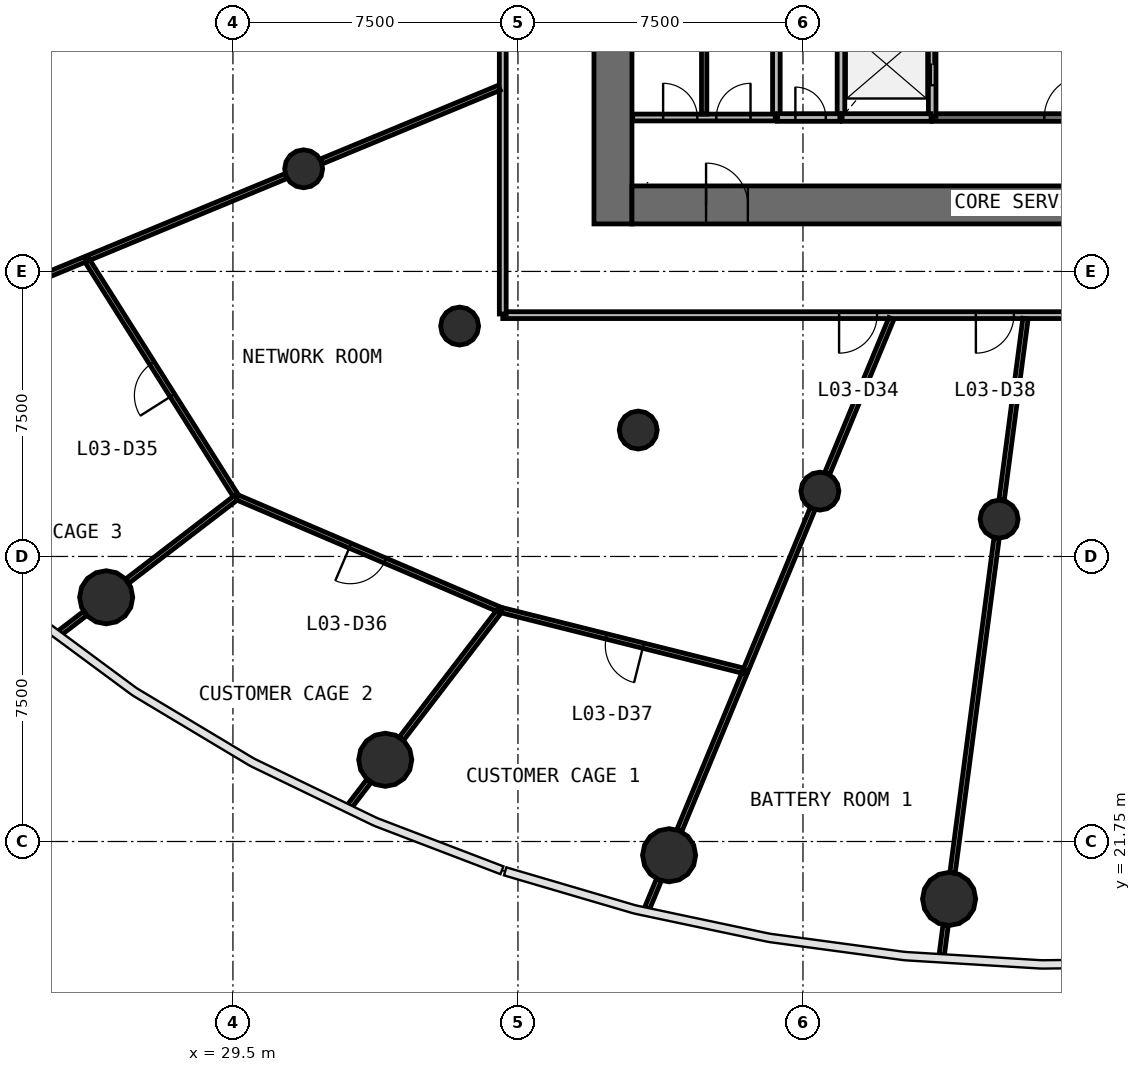
"""IFC4 building model, lengths in metres.
Left out: names, types, materials, properties, quantities, classifications, styles, units other than length and angle.
Written with IfcOpenShell. Run it as: python <this file> out.ifc"""

import sys

from ifc_helpers import new_model, si_unit, direction, frame, frame_2d, origin, origin_2d, place, context, subcontext, project, spatial, rectangle, circle, extrude, source, transform, mapped, element, fill, save


model = new_model("IFC4")
c1 = context("Model", 3, precision=1e-05, world=origin(), true_north=direction((0.0, 1.0)))
c2 = subcontext(c1, "Body", "Model", "MODEL_VIEW")
j1 = project(units=[si_unit("LENGTHUNIT", "METRE"), si_unit("PLANEANGLEUNIT", "RADIAN")], contexts=[c1])
p1 = place(None, origin())
s1 = spatial("IfcSite", under=j1, at=p1, CompositionType="ELEMENT")
p2 = place(p1, origin())
s2 = spatial("IfcBuilding", under=s1, at=p2, CompositionType="ELEMENT")
p3 = place(p2, frame((0.0, 0.0, 13.8)))
s3 = spatial("IfcBuildingStorey", under=s2, at=p3, CompositionType="ELEMENT", Elevation=13.8)
p4 = place(p3, frame((39.5, 58.0, 0.0), z_axis=(0.0, 0.0, 1.0), x_axis=(0.0, -1.0, 0.0)))
e1 = element("IfcWall", 1, at=p4, inside=s3, PredefinedType="SHEAR", context=c2, shape_type="SweptSolid", body=[
    extrude(rectangle(XDim=20.0, YDim=1.0, at=frame_2d((10.0, 0.0))), origin(), (0.0, 0.0, 1.0), 4.4),
])
p5 = place(p4, frame((9.1, 0.0, 0.0)))
e2 = element("IfcOpeningElement", 2, at=p5, cuts=e1, PredefinedType="OPENING", context=c2, shape_type="SweptSolid", body=[
    extrude(rectangle(XDim=1.8, YDim=2.1, at=frame_2d((0.9, 1.05))), frame((0.0, 0.51, 0.0), z_axis=(0.0, -1.0, 0.0), x_axis=(1.0, 0.0, 0.0)), (0.0, 0.0, 1.0), 1.02),
])
p6 = place(p3, frame((40.0, 38.5, 0.0), z_axis=(0.0, 0.0, 1.0), x_axis=(1.0, 0.0, 0.0)))
e3 = element("IfcWall", 3, at=p6, inside=s3, PredefinedType="SHEAR", context=c2, shape_type="SweptSolid", body=[
    extrude(rectangle(XDim=24.0, YDim=1.0, at=frame_2d((12.0, 0.0))), origin(), (0.0, 0.0, 1.0), 4.4),
])
p7 = place(p6, frame((21.45, 0.0, 0.0)))
e4 = element("IfcOpeningElement", 4, at=p7, cuts=e3, PredefinedType="OPENING", context=c2, shape_type="SweptSolid", body=[
    extrude(rectangle(XDim=1.1, YDim=2.1, at=frame_2d((0.55, 1.05))), frame((0.0, 0.51, 0.0), z_axis=(0.0, -1.0, 0.0), x_axis=(1.0, 0.0, 0.0)), (0.0, 0.0, 1.0), 1.02),
])
p8 = place(p6, frame((1.95, 0.0, 0.0)))
e5 = element("IfcOpeningElement", 5, at=p8, cuts=e3, PredefinedType="OPENING", context=c2, shape_type="SweptSolid", body=[
    extrude(rectangle(XDim=1.1, YDim=2.1, at=frame_2d((0.55, 1.05))), frame((0.0, 0.51, 0.0), z_axis=(0.0, -1.0, 0.0), x_axis=(1.0, 0.0, 0.0)), (0.0, 0.0, 1.0), 1.02),
])
m1 = source(origin(), c2, "Body", "SweptSolid", [
    extrude(circle(Radius=0.7, at=origin_2d()), origin(), (0.0, 0.0, 1.0), 4.4),
])
for number, where, z_axis, x_axis in (
    (6, (26.164, 28.176, 0.0), (0.0, 0.0, 1.0), (1.0, 0.0, 0.0)),
    (7, (33.508, 23.9, 0.0), (0.0, 0.0, 1.0), (1.0, 0.0, 0.0)),
    (8, (40.977, 21.389, 0.0), (0.0, 0.0, 1.0), (1.0, 0.0, 0.0)),
    (9, (48.345, 20.239, 0.0), (0.0, 0.0, 1.0), (1.0, 0.0, 0.0)),
):
    element("IfcColumn", number, at=place(p3, frame(where, z_axis=z_axis, x_axis=x_axis)), inside=s3, PredefinedType="COLUMN", context=c2, shape_type="MappedRepresentation", body=[
        mapped(m1, transform((0.0, 0.0, 0.0), scale=1.0)),
    ])
m2 = source(origin(), c2, "Body", "SweptSolid", [
    extrude(circle(Radius=0.5, at=origin_2d()), origin(), (0.0, 0.0, 1.0), 4.4),
])
for number, where, z_axis, x_axis in (
    (10, (31.361, 39.451, 0.0), (0.0, 0.0, 1.0), (1.0, 0.0, 0.0)),
    (11, (35.465, 35.312, 0.0), (0.0, 0.0, 1.0), (1.0, 0.0, 0.0)),
    (12, (40.165, 32.576, 0.0), (0.0, 0.0, 1.0), (1.0, 0.0, 0.0)),
    (13, (44.945, 30.969, 0.0), (0.0, 0.0, 1.0), (1.0, 0.0, 0.0)),
    (14, (49.661, 30.233, 0.0), (0.0, 0.0, 1.0), (1.0, 0.0, 0.0)),
):
    element("IfcColumn", number, at=place(p3, frame(where, z_axis=z_axis, x_axis=x_axis)), inside=s3, PredefinedType="COLUMN", context=c2, shape_type="MappedRepresentation", body=[
        mapped(m2, transform((0.0, 0.0, 0.0), scale=1.0)),
    ])
p9 = place(p3, frame((47.9, 40.8, 0.0), z_axis=(0.0, 0.0, 1.0), x_axis=(1.0, 0.0, 0.0)))
e15 = element("IfcWall", 15, at=p9, inside=s3, PredefinedType="SOLIDWALL", context=c2, shape_type="SweptSolid", body=[
    extrude(rectangle(XDim=5.67, YDim=0.2, at=frame_2d((2.835, 0.0))), origin(), (0.0, 0.0, 1.0), 4.05),
])
p10 = place(p9, frame((2.95, 0.0, 0.0)))
e16 = element("IfcOpeningElement", 16, at=p10, cuts=e15, PredefinedType="OPENING", context=c2, shape_type="SweptSolid", body=[
    extrude(rectangle(XDim=1.1, YDim=2.1, at=frame_2d((0.55, 1.05))), frame((0.0, 0.11, 0.0), z_axis=(0.0, -1.0, 0.0), x_axis=(1.0, 0.0, 0.0)), (0.0, 0.0, 1.0), 0.22),
])
for number, where, z_axis, x_axis in (
    (17, (43.8, 43.6, 0.0), (0.0, 0.0, 1.0), (0.0, -1.0, 0.0)),
    (18, (45.5, 43.6, 0.0), (0.0, 0.0, 1.0), (0.0, -1.0, 0.0)),
):
    element("IfcWall", number, at=place(p3, frame(where, z_axis=z_axis, x_axis=x_axis)), inside=s3, PredefinedType="SOLIDWALL", context=c2, shape_type="SweptSolid", body=[
        extrude(rectangle(XDim=2.8, YDim=0.2, at=frame_2d((1.4, 0.0))), origin(), (0.0, 0.0, 1.0), 4.05),
    ])
p11 = place(p3, frame((47.9, 40.83, 0.0), z_axis=(0.0, 0.0, 1.0), x_axis=(0.0, 1.0, 0.0)))
e19 = element("IfcWall", 19, at=p11, inside=s3, PredefinedType="SOLIDWALL", context=c2, shape_type="SweptSolid", body=[
    extrude(rectangle(XDim=2.77, YDim=0.2, at=frame_2d((1.385, 0.0))), origin(), (0.0, 0.0, 1.0), 4.05),
])
p12 = place(p11, frame((0.82, 0.0, 0.0)))
e20 = element("IfcOpeningElement", 20, at=p12, cuts=e19, PredefinedType="OPENING", context=c2, shape_type="SweptSolid", body=[
    extrude(rectangle(XDim=1.1, YDim=2.1, at=frame_2d((0.55, 1.05))), frame((0.0, 0.11, 0.0), z_axis=(0.0, -1.0, 0.0), x_axis=(1.0, 0.0, 0.0)), (0.0, 0.0, 1.0), 0.22),
])
p13 = place(p3, frame((45.53, 40.8, 0.0), z_axis=(0.0, 0.0, 1.0), x_axis=(1.0, 0.0, 0.0)))
e21 = element("IfcWall", 21, at=p13, inside=s3, PredefinedType="SOLIDWALL", context=c2, shape_type="SweptSolid", body=[
    extrude(rectangle(XDim=2.34, YDim=0.2, at=frame_2d((1.17, 0.0))), origin(), (0.0, 0.0, 1.0), 4.05),
])
p14 = place(p3, frame((43.83, 40.8, 0.0), z_axis=(0.0, 0.0, 1.0), x_axis=(1.0, 0.0, 0.0)))
e22 = element("IfcWall", 22, at=p14, inside=s3, PredefinedType="SOLIDWALL", context=c2, shape_type="SweptSolid", body=[
    extrude(rectangle(XDim=1.64, YDim=0.2, at=frame_2d((0.82, 0.0))), origin(), (0.0, 0.0, 1.0), 4.05),
])
p15 = place(p14, frame((0.47, 0.0, 0.0)))
e23 = element("IfcOpeningElement", 23, at=p15, cuts=e22, PredefinedType="OPENING", context=c2, shape_type="SweptSolid", body=[
    extrude(rectangle(XDim=0.8, YDim=2.1, at=frame_2d((0.4, 1.05))), frame((0.0, 0.11, 0.0), z_axis=(0.0, -1.0, 0.0), x_axis=(1.0, 0.0, 0.0)), (0.0, 0.0, 1.0), 0.22),
])
p16 = place(p3, frame((67.4, 35.6, 0.0), z_axis=(0.0, 0.0, 1.0), x_axis=(-1.0, 0.0, 0.0)))
e24 = element("IfcWall", 24, at=p16, inside=s3, PredefinedType="PARTITIONING", context=c2, shape_type="SweptSolid", body=[
    extrude(rectangle(XDim=30.8, YDim=0.18, at=frame_2d((15.4, 0.0))), origin(), (0.0, 0.0, 1.0), 3.25),
])
p17 = place(p16, frame((20.95, 0.0, 0.0)))
e25 = element("IfcOpeningElement", 25, at=p17, cuts=e24, PredefinedType="OPENING", context=c2, shape_type="SweptSolid", body=[
    extrude(rectangle(XDim=1.0, YDim=2.1, at=frame_2d((0.5, 1.05))), frame((0.0, 0.1, 0.0), z_axis=(0.0, -1.0, 0.0), x_axis=(1.0, 0.0, 0.0)), (0.0, 0.0, 1.0), 0.2),
])
p18 = place(p16, frame((17.35, 0.0, 0.0)))
e26 = element("IfcOpeningElement", 26, at=p18, cuts=e24, PredefinedType="OPENING", context=c2, shape_type="SweptSolid", body=[
    extrude(rectangle(XDim=1.0, YDim=2.1, at=frame_2d((0.5, 1.05))), frame((0.0, 0.1, 0.0), z_axis=(0.0, -1.0, 0.0), x_axis=(1.0, 0.0, 0.0)), (0.0, 0.0, 1.0), 0.2),
])
p19 = place(p16, frame((14.95, 0.0, 0.0)))
e27 = element("IfcOpeningElement", 27, at=p19, cuts=e24, PredefinedType="OPENING", context=c2, shape_type="SweptSolid", body=[
    extrude(rectangle(XDim=1.0, YDim=2.1, at=frame_2d((0.5, 1.05))), frame((0.0, 0.1, 0.0), z_axis=(0.0, -1.0, 0.0), x_axis=(1.0, 0.0, 0.0)), (0.0, 0.0, 1.0), 0.2),
])
p20 = place(p3, frame((36.6, 35.63, 0.0), z_axis=(0.0, 0.0, 1.0), x_axis=(0.0, 1.0, 0.0)))
e28 = element("IfcWall", 28, at=p20, inside=s3, PredefinedType="PARTITIONING", context=c2, shape_type="SweptSolid", body=[
    extrude(rectangle(XDim=23.583, YDim=0.18, at=frame_2d((11.791, 0.0))), origin(), (0.0, 0.0, 1.0), 3.25),
])
p21 = place(p20, frame((11.333, 0.0, 0.0)))
e29 = element("IfcOpeningElement", 29, at=p21, cuts=e28, PredefinedType="OPENING", context=c2, shape_type="SweptSolid", body=[
    extrude(rectangle(XDim=1.0, YDim=2.1, at=frame_2d((0.5, 1.05))), frame((0.0, 0.1, 0.0), z_axis=(0.0, -1.0, 0.0), x_axis=(1.0, 0.0, 0.0)), (0.0, 0.0, 1.0), 0.2),
])
p22 = place(p3, frame((40.02, 40.8, 0.0), z_axis=(0.0, 0.0, 1.0), x_axis=(1.0, 0.0, 0.0)))
e30 = element("IfcWall", 30, at=p22, inside=s3, PredefinedType="PARTITIONING", context=c2, shape_type="SweptSolid", body=[
    extrude(rectangle(XDim=3.75, YDim=0.18, at=frame_2d((1.875, 0.0))), origin(), (0.0, 0.0, 1.0), 4.05),
])
p23 = place(p22, frame((0.8, 0.0, 0.0)))
e31 = element("IfcOpeningElement", 31, at=p23, cuts=e30, PredefinedType="OPENING", context=c2, shape_type="SweptSolid", body=[
    extrude(rectangle(XDim=0.9, YDim=2.1, at=frame_2d((0.45, 1.05))), frame((0.0, 0.1, 0.0), z_axis=(0.0, -1.0, 0.0), x_axis=(1.0, 0.0, 0.0)), (0.0, 0.0, 1.0), 0.2),
])
p24 = place(p22, frame((2.2, 0.0, 0.0)))
e32 = element("IfcOpeningElement", 32, at=p24, cuts=e30, PredefinedType="OPENING", context=c2, shape_type="SweptSolid", body=[
    extrude(rectangle(XDim=0.9, YDim=2.1, at=frame_2d((0.45, 1.05))), frame((0.0, 0.1, 0.0), z_axis=(0.0, -1.0, 0.0), x_axis=(1.0, 0.0, 0.0)), (0.0, 0.0, 1.0), 0.2),
])
p25 = place(p3, frame((49.595, 29.733, 0.0), z_axis=(0.0, 0.0, 1.0), x_axis=(-0.130521426482, -0.991445488783, 0.0)))
e33 = element("IfcWall", 33, at=p25, inside=s3, PredefinedType="PARTITIONING", context=c2, shape_type="SweptSolid", body=[
    extrude(rectangle(XDim=8.872, YDim=0.14, at=frame_2d((4.436, 0.0))), origin(), (0.0, 0.0, 1.0), 3.25),
])
p26 = place(p3, frame((36.535, 27.845, 0.0), z_axis=(0.0, 0.0, 1.0), x_axis=(-0.919481175992, 0.393134031847, 0.0)))
e34 = element("IfcWall", 34, at=p26, inside=s3, PredefinedType="PARTITIONING", context=c2, shape_type="SweptSolid", body=[
    extrude(rectangle(XDim=7.543, YDim=0.14, at=frame_2d((3.772, 0.0))), origin(), (0.0, 0.0, 1.0), 3.25),
])
p27 = place(p26, frame((3.293, 0.0, 0.0)))
e35 = element("IfcOpeningElement", 35, at=p27, cuts=e34, PredefinedType="OPENING", context=c2, shape_type="SweptSolid", body=[
    extrude(rectangle(XDim=1.0, YDim=2.1, at=frame_2d((0.5, 1.05))), frame((0.0, 0.08, 0.0), z_axis=(0.0, -1.0, 0.0), x_axis=(1.0, 0.0, 0.0)), (0.0, 0.0, 1.0), 0.16),
])
p28 = place(p3, frame((29.583, 30.836, 0.0), z_axis=(0.0, 0.0, 1.0), x_axis=(-0.534385893392, 0.845240626652, 0.0)))
e36 = element("IfcWall", 36, at=p28, inside=s3, PredefinedType="PARTITIONING", context=c2, shape_type="SweptSolid", body=[
    extrude(rectangle(XDim=7.386, YDim=0.14, at=frame_2d((3.693, 0.0))), origin(), (0.0, 0.0, 1.0), 3.25),
])
p29 = place(p28, frame((3.136, 0.0, 0.0)))
e37 = element("IfcOpeningElement", 37, at=p29, cuts=e36, PredefinedType="OPENING", context=c2, shape_type="SweptSolid", body=[
    extrude(rectangle(XDim=1.0, YDim=2.1, at=frame_2d((0.5, 1.05))), frame((0.0, 0.08, 0.0), z_axis=(0.0, -1.0, 0.0), x_axis=(1.0, 0.0, 0.0)), (0.0, 0.0, 1.0), 0.16),
])
p30 = place(p3, frame((42.983, 26.23, 0.0), z_axis=(0.0, 0.0, 1.0), x_axis=(-0.970027362967, 0.242995710034, 0.0)))
e38 = element("IfcWall", 38, at=p30, inside=s3, PredefinedType="PARTITIONING", context=c2, shape_type="SweptSolid", body=[
    extrude(rectangle(XDim=6.617, YDim=0.14, at=frame_2d((3.309, 0.0))), origin(), (0.0, 0.0, 1.0), 3.25),
])
p31 = place(p30, frame((2.767, 0.0, 0.0)))
e39 = element("IfcOpeningElement", 39, at=p31, cuts=e38, PredefinedType="OPENING", context=c2, shape_type="SweptSolid", body=[
    extrude(rectangle(XDim=1.0, YDim=2.1, at=frame_2d((0.5, 1.05))), frame((0.0, 0.08, 0.0), z_axis=(0.0, -1.0, 0.0), x_axis=(1.0, 0.0, 0.0)), (0.0, 0.0, 1.0), 0.16),
])
p32 = place(p3, frame((30.894, 39.258, 0.0), z_axis=(0.0, 0.0, 1.0), x_axis=(-0.923862765396, -0.382723909253, 0.0)))
e40 = element("IfcWall", 40, at=p32, inside=s3, PredefinedType="PARTITIONING", context=c2, shape_type="SweptSolid", body=[
    extrude(rectangle(XDim=5.621, YDim=0.14, at=frame_2d((2.81, 0.0))), origin(), (0.0, 0.0, 1.0), 3.25),
])
p33 = place(p3, frame((25.608, 37.068, 0.0), z_axis=(0.0, 0.0, 1.0), x_axis=(-0.92387741194, -0.382688551836, 0.0)))
e41 = element("IfcWall", 41, at=p33, inside=s3, PredefinedType="PARTITIONING", context=c2, shape_type="SweptSolid", body=[
    extrude(rectangle(XDim=5.635, YDim=0.14, at=frame_2d((2.817, 0.0))), origin(), (0.0, 0.0, 1.0), 3.25),
])
p34 = place(p3, frame((36.51, 41.584, 0.0), z_axis=(0.0, 0.0, 1.0), x_axis=(-0.923890025086, -0.382658100067, 0.0)))
e42 = element("IfcWall", 42, at=p34, inside=s3, PredefinedType="PARTITIONING", context=c2, shape_type="SweptSolid", body=[
    extrude(rectangle(XDim=5.068, YDim=0.14, at=frame_2d((2.534, 0.0))), origin(), (0.0, 0.0, 1.0), 3.25),
])
p35 = place(p3, frame((50.356, 35.51, 0.0), z_axis=(0.0, 0.0, 1.0), x_axis=(-0.130523979823, -0.991445152639, 0.0)))
e43 = element("IfcWall", 43, at=p35, inside=s3, PredefinedType="PARTITIONING", context=c2, shape_type="SweptSolid", body=[
    extrude(rectangle(XDim=4.818, YDim=0.14, at=frame_2d((2.409, 0.0))), origin(), (0.0, 0.0, 1.0), 3.25),
])
p36 = place(p3, frame((44.752, 30.502, 0.0), z_axis=(0.0, 0.0, 1.0), x_axis=(-0.38269755953, -0.923873680721, 0.0)))
e44 = element("IfcWall", 44, at=p36, inside=s3, PredefinedType="PARTITIONING", context=c2, shape_type="SweptSolid", body=[
    extrude(rectangle(XDim=4.594, YDim=0.14, at=frame_2d((2.297, 0.0))), origin(), (0.0, 0.0, 1.0), 3.25),
])
p37 = place(p3, frame((42.956, 26.165, 0.0), z_axis=(0.0, 0.0, 1.0), x_axis=(-0.382638321624, -0.923898216702, 0.0)))
e45 = element("IfcWall", 45, at=p37, inside=s3, PredefinedType="PARTITIONING", context=c2, shape_type="SweptSolid", body=[
    extrude(rectangle(XDim=4.465, YDim=0.14, at=frame_2d((2.232, 0.0))), origin(), (0.0, 0.0, 1.0), 3.25),
])
p38 = place(p3, frame((46.826, 35.51, 0.0), z_axis=(0.0, 0.0, 1.0), x_axis=(-0.382672831764, -0.923883923353, 0.0)))
e46 = element("IfcWall", 46, at=p38, inside=s3, PredefinedType="PARTITIONING", context=c2, shape_type="SweptSolid", body=[
    extrude(rectangle(XDim=4.41, YDim=0.14, at=frame_2d((2.205, 0.0))), origin(), (0.0, 0.0, 1.0), 3.25),
])
p39 = place(p3, frame((36.491, 27.788, 0.0), z_axis=(0.0, 0.0, 1.0), x_axis=(-0.608788130652, -0.793332850686, 0.0)))
e47 = element("IfcWall", 47, at=p39, inside=s3, PredefinedType="PARTITIONING", context=c2, shape_type="SweptSolid", body=[
    extrude(rectangle(XDim=4.196, YDim=0.14, at=frame_2d((2.098, 0.0))), origin(), (0.0, 0.0, 1.0), 3.25),
])
p40 = place(p3, frame((29.575, 30.793, 0.0), z_axis=(0.0, 0.0, 1.0), x_axis=(-0.793358147318, -0.608755164319, 0.0)))
e48 = element("IfcWall", 48, at=p40, inside=s3, PredefinedType="PARTITIONING", context=c2, shape_type="SweptSolid", body=[
    extrude(rectangle(XDim=3.594, YDim=0.14, at=frame_2d((1.797, 0.0))), origin(), (0.0, 0.0, 1.0), 3.25),
])
p41 = place(p3, frame((41.9, 40.89, 0.0), z_axis=(0.0, 0.0, 1.0), x_axis=(0.0, 1.0, 0.0)))
e49 = element("IfcWall", 49, at=p41, inside=s3, PredefinedType="PARTITIONING", context=c2, shape_type="SweptSolid", body=[
    extrude(rectangle(XDim=2.71, YDim=0.14, at=frame_2d((1.355, 0.0))), origin(), (0.0, 0.0, 1.0), 3.25),
])
p42 = place(p3, frame((25.606, 27.747, 0.0), z_axis=(0.0, 0.0, 1.0), x_axis=(-0.793456422987, -0.608627065468, 0.0)))
e50 = element("IfcWall", 50, at=p42, inside=s3, PredefinedType="PARTITIONING", context=c2, shape_type="SweptSolid", body=[
    extrude(rectangle(XDim=0.839, YDim=0.14, at=frame_2d((0.419, 0.0))), origin(), (0.0, 0.0, 1.0), 3.25),
])
p43 = place(p3, frame((33.079, 23.342, 0.0), z_axis=(0.0, 0.0, 1.0), x_axis=(-0.608939798959, -0.793216440351, 0.0)))
e51 = element("IfcWall", 51, at=p43, inside=s3, PredefinedType="PARTITIONING", context=c2, shape_type="SweptSolid", body=[
    extrude(rectangle(XDim=0.827, YDim=0.14, at=frame_2d((0.413, 0.0))), origin(), (0.0, 0.0, 1.0), 3.25),
])
p44 = place(p3, frame((40.708, 20.737, 0.0), z_axis=(0.0, 0.0, 1.0), x_axis=(-0.382692107758, -0.923875938998, 0.0)))
e52 = element("IfcWall", 52, at=p44, inside=s3, PredefinedType="PARTITIONING", context=c2, shape_type="SweptSolid", body=[
    extrude(rectangle(XDim=0.802, YDim=0.14, at=frame_2d((0.401, 0.0))), origin(), (0.0, 0.0, 1.0), 3.25),
])
p45 = place(p3, frame((48.253, 19.54, 0.0), z_axis=(0.0, 0.0, 1.0), x_axis=(-0.130598952658, -0.991435279564, 0.0)))
e53 = element("IfcWall", 53, at=p45, inside=s3, PredefinedType="PARTITIONING", context=c2, shape_type="SweptSolid", body=[
    extrude(rectangle(XDim=0.787, YDim=0.14, at=frame_2d((0.394, 0.0))), origin(), (0.0, 0.0, 1.0), 3.25),
])
m3 = source(origin(), c2, "Body", "SweptSolid", [
    extrude(rectangle(XDim=1.1, YDim=2.1, at=frame_2d((0.55, 1.05))), frame((0.0, 0.025, 0.0), z_axis=(0.0, -1.0, 0.0), x_axis=(1.0, 0.0, 0.0)), (0.0, 0.0, 1.0), 0.05),
])
p46 = place(p12, origin())
e54 = element("IfcDoor", 54, at=p46, inside=s3, OperationType="DOUBLE_DOOR_SLIDING", PredefinedType="USERDEFINED", context=c2, shape_type="MappedRepresentation", body=[
    mapped(m3, transform((0.0, 0.0, 0.0), scale=1.0)),
])
fill(e20, e54)
m4 = source(origin(), c2, "Body", "SweptSolid", [
    extrude(rectangle(XDim=1.1, YDim=2.1, at=frame_2d((0.55, 1.05))), frame((0.0, 0.025, 0.0), z_axis=(0.0, -1.0, 0.0), x_axis=(1.0, 0.0, 0.0)), (0.0, 0.0, 1.0), 0.05),
])
p47 = place(p10, origin())
e55 = element("IfcDoor", 55, at=p47, inside=s3, OperationType="SINGLE_SWING_RIGHT", PredefinedType="DOOR", context=c2, shape_type="MappedRepresentation", body=[
    mapped(m4, transform((0.0, 0.0, 0.0), scale=1.0)),
])
fill(e16, e55)
m5 = source(origin(), c2, "Body", "SweptSolid", [
    extrude(rectangle(XDim=0.8, YDim=2.1, at=frame_2d((0.4, 1.05))), frame((0.0, 0.025, 0.0), z_axis=(0.0, -1.0, 0.0), x_axis=(1.0, 0.0, 0.0)), (0.0, 0.0, 1.0), 0.05),
])
p48 = place(p15, origin())
e56 = element("IfcDoor", 56, at=p48, inside=s3, OperationType="SINGLE_SWING_LEFT", PredefinedType="DOOR", context=c2, shape_type="MappedRepresentation", body=[
    mapped(m5, transform((0.0, 0.0, 0.0), scale=1.0)),
])
fill(e23, e56)
m6 = source(origin(), c2, "Body", "SweptSolid", [
    extrude(rectangle(XDim=1.1, YDim=2.1, at=frame_2d((0.55, 1.05))), frame((0.0, 0.025, 0.0), z_axis=(0.0, -1.0, 0.0), x_axis=(1.0, 0.0, 0.0)), (0.0, 0.0, 1.0), 0.05),
])
p49 = place(p8, origin())
e57 = element("IfcDoor", 57, at=p49, inside=s3, OperationType="SINGLE_SWING_LEFT", PredefinedType="DOOR", context=c2, shape_type="MappedRepresentation", body=[
    mapped(m6, transform((0.0, 0.0, 0.0), scale=1.0)),
])
fill(e5, e57)
m7 = source(origin(), c2, "Body", "SweptSolid", [
    extrude(rectangle(XDim=1.0, YDim=2.1, at=frame_2d((0.5, 1.05))), frame((0.0, 0.025, 0.0), z_axis=(0.0, -1.0, 0.0), x_axis=(1.0, 0.0, 0.0)), (0.0, 0.0, 1.0), 0.05),
])
p50 = place(p17, origin())
e58 = element("IfcDoor", 58, at=p50, inside=s3, OperationType="SINGLE_SWING_RIGHT", PredefinedType="DOOR", context=c2, shape_type="MappedRepresentation", body=[
    mapped(m7, transform((0.0, 0.0, 0.0), scale=1.0)),
])
fill(e25, e58)
p51 = place(p29, origin())
e59 = element("IfcDoor", 59, at=p51, inside=s3, OperationType="SINGLE_SWING_LEFT", PredefinedType="DOOR", context=c2, shape_type="MappedRepresentation", body=[
    mapped(m7, transform((0.0, 0.0, 0.0), scale=1.0)),
])
fill(e37, e59)
p52 = place(p27, origin())
e60 = element("IfcDoor", 60, at=p52, inside=s3, OperationType="SINGLE_SWING_RIGHT", PredefinedType="DOOR", context=c2, shape_type="MappedRepresentation", body=[
    mapped(m7, transform((0.0, 0.0, 0.0), scale=1.0)),
])
fill(e35, e60)
p53 = place(p31, origin())
e61 = element("IfcDoor", 61, at=p53, inside=s3, OperationType="SINGLE_SWING_LEFT", PredefinedType="DOOR", context=c2, shape_type="MappedRepresentation", body=[
    mapped(m7, transform((0.0, 0.0, 0.0), scale=1.0)),
])
fill(e39, e61)
p54 = place(p18, origin())
e62 = element("IfcDoor", 62, at=p54, inside=s3, OperationType="SINGLE_SWING_RIGHT", PredefinedType="DOOR", context=c2, shape_type="MappedRepresentation", body=[
    mapped(m7, transform((0.0, 0.0, 0.0), scale=1.0)),
])
fill(e26, e62)
m8 = source(origin(), c2, "Body", "SweptSolid", [
    extrude(rectangle(XDim=0.9, YDim=2.1, at=frame_2d((0.45, 1.05))), frame((0.0, 0.025, 0.0), z_axis=(0.0, -1.0, 0.0), x_axis=(1.0, 0.0, 0.0)), (0.0, 0.0, 1.0), 0.05),
])
p55 = place(p23, origin())
e63 = element("IfcDoor", 63, at=p55, inside=s3, OperationType="SINGLE_SWING_LEFT", PredefinedType="DOOR", context=c2, shape_type="MappedRepresentation", body=[
    mapped(m8, transform((0.0, 0.0, 0.0), scale=1.0)),
])
fill(e31, e63)
p56 = place(p24, origin())
e64 = element("IfcDoor", 64, at=p56, inside=s3, OperationType="SINGLE_SWING_RIGHT", PredefinedType="DOOR", context=c2, shape_type="MappedRepresentation", body=[
    mapped(m8, transform((0.0, 0.0, 0.0), scale=1.0)),
])
fill(e32, e64)
save(model, sys.argv[1])
